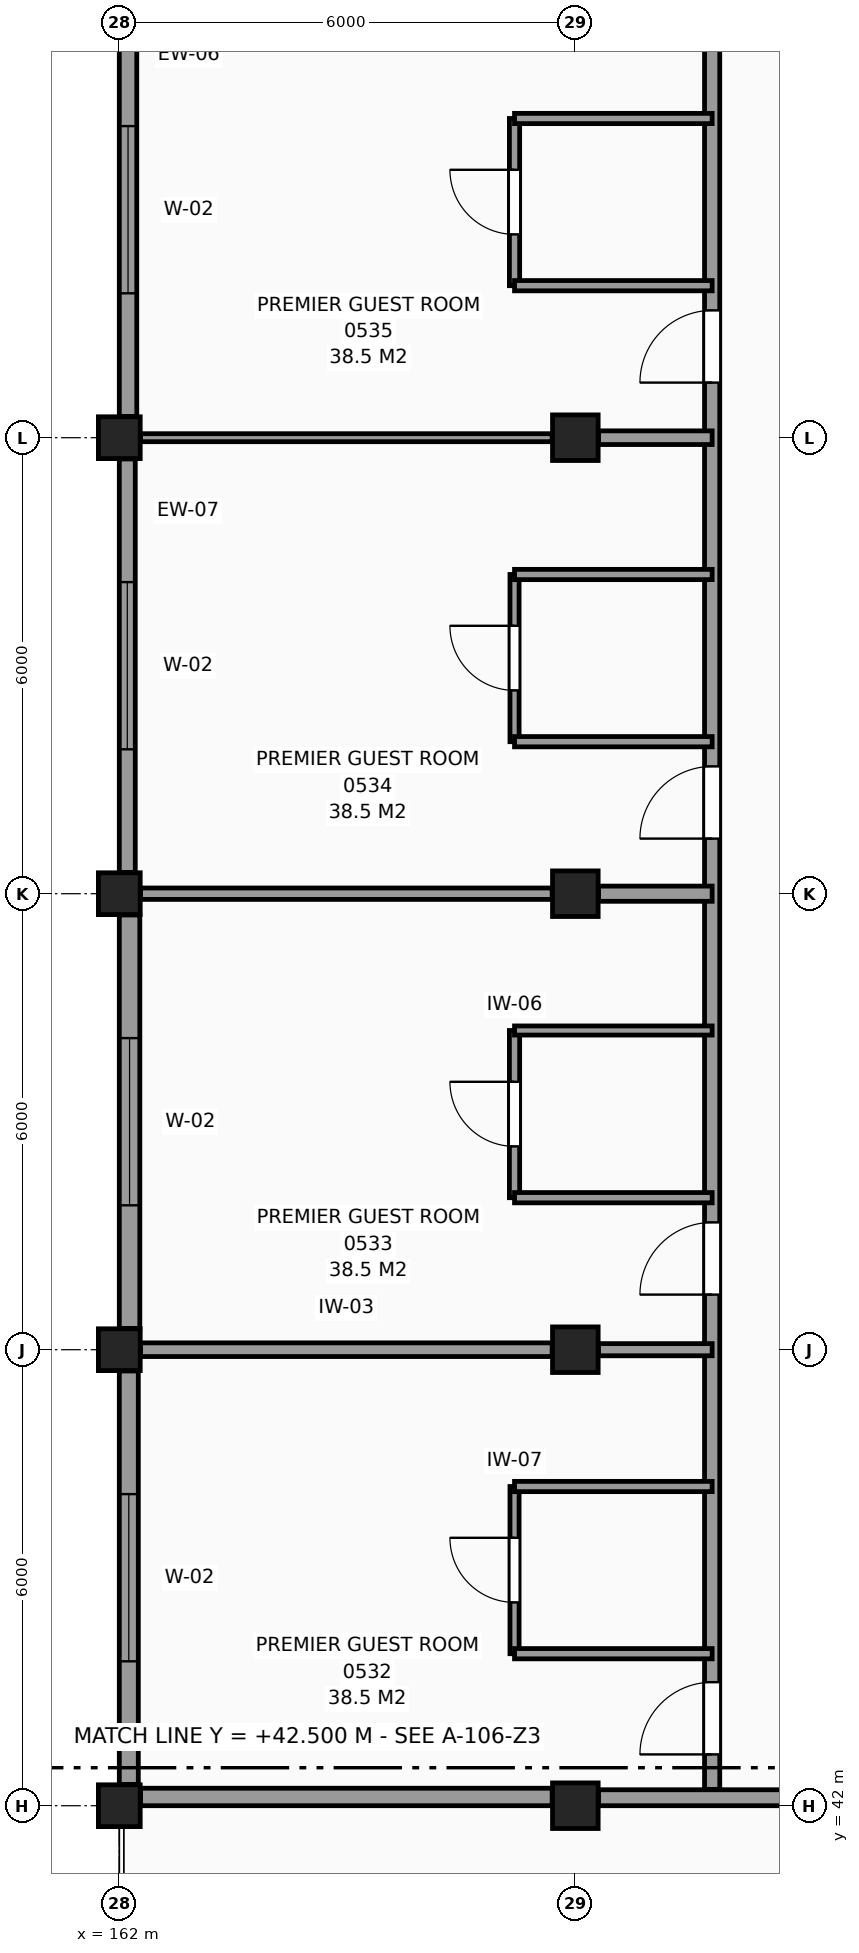
"""IFC4 building model, lengths in metres.
Left out: names, types, materials, properties, quantities, classifications, styles, units other than length and angle.
Written with IfcOpenShell. Run it as: python <this file> out.ifc"""

import sys

from ifc_helpers import new_model, si_unit, direction, frame, frame_2d, origin, origin_2d, place, context, subcontext, project, spatial, rectangle, extrude, element, fill, save


model = new_model("IFC4")
c1 = context("Model", 3, precision=1e-05, world=origin(), true_north=direction((0.0, 1.0)))
c2 = subcontext(c1, "Body", "Model", "MODEL_VIEW")
j1 = project(units=[si_unit("LENGTHUNIT", "METRE"), si_unit("PLANEANGLEUNIT", "RADIAN")], contexts=[c1])
p1 = place(None, origin())
s1 = spatial("IfcSite", under=j1, at=p1, CompositionType="ELEMENT")
p2 = place(p1, origin())
s2 = spatial("IfcBuilding", under=s1, at=p2, CompositionType="ELEMENT")
p3 = place(p2, frame((0.0, 0.0, 24.6)))
s3 = spatial("IfcBuildingStorey", under=s2, at=p3, CompositionType="ELEMENT", Elevation=24.6)
for number, where, z_axis, x_axis in (
    (1, (162.0, 42.0, 0.0), (0.0, 0.0, 1.0), (1.0, 0.0, 0.0)),
    (2, (162.0, 48.0, 0.0), (0.0, 0.0, 1.0), (1.0, 0.0, 0.0)),
    (3, (162.0, 54.0, 0.0), (0.0, 0.0, 1.0), (1.0, 0.0, 0.0)),
    (4, (162.0, 60.0, 0.0), (0.0, 0.0, 1.0), (1.0, 0.0, 0.0)),
):
    element("IfcColumn", number, at=place(p3, frame(where, z_axis=z_axis, x_axis=x_axis)), inside=s3, PredefinedType="COLUMN", context=c2, shape_type="SweptSolid", body=[
        extrude(rectangle(XDim=0.55, YDim=0.55, at=origin_2d()), origin(), (0.0, 0.0, 1.0), 3.6),
    ])
for number, where, z_axis, x_axis in (
    (5, (168.0, 42.0, 0.0), (0.0, 0.0, 1.0), (1.0, 0.0, 0.0)),
    (6, (168.0, 48.0, 0.0), (0.0, 0.0, 1.0), (1.0, 0.0, 0.0)),
    (7, (168.0, 54.0, 0.0), (0.0, 0.0, 1.0), (1.0, 0.0, 0.0)),
    (8, (168.0, 60.0, 0.0), (0.0, 0.0, 1.0), (1.0, 0.0, 0.0)),
):
    element("IfcColumn", number, at=place(p3, frame(where, z_axis=z_axis, x_axis=x_axis)), inside=s3, PredefinedType="COLUMN", context=c2, shape_type="SweptSolid", body=[
        extrude(rectangle(XDim=0.6, YDim=0.6, at=origin_2d()), origin(), (0.0, 0.0, 1.0), 3.6),
    ])
p4 = place(p3, frame((162.115, 65.72, 0.0), z_axis=(0.0, 0.0, 1.0), x_axis=(0.0, -1.0, 0.0)))
e9 = element("IfcWall", 9, at=p4, inside=s3, PredefinedType="SOLIDWALL", context=c2, shape_type="SweptSolid", body=[
    extrude(rectangle(XDim=5.44, YDim=0.23, at=frame_2d((2.72, 0.0))), origin(), (0.0, 0.0, 1.0), 2.73),
])
p5 = place(p4, frame((1.62, 0.0, 0.8)))
e10 = element("IfcOpeningElement", 10, at=p5, cuts=e9, PredefinedType="OPENING", context=c2, shape_type="SweptSolid", body=[
    extrude(rectangle(XDim=2.2, YDim=1.75, at=frame_2d((1.1, 0.875))), frame((0.0, 0.125, 0.0), z_axis=(0.0, -1.0, 0.0), x_axis=(1.0, 0.0, 0.0)), (0.0, 0.0, 1.0), 0.25),
])
p6 = place(p3, frame((162.105, 59.72, 0.0), z_axis=(0.0, 0.0, 1.0), x_axis=(0.0, -1.0, 0.0)))
e11 = element("IfcWall", 11, at=p6, inside=s3, PredefinedType="SOLIDWALL", context=c2, shape_type="SweptSolid", body=[
    extrude(rectangle(XDim=5.44, YDim=0.21, at=frame_2d((2.72, 0.0))), origin(), (0.0, 0.0, 1.0), 2.73),
])
p7 = place(p6, frame((1.62, 0.0, 0.8)))
e12 = element("IfcOpeningElement", 12, at=p7, cuts=e11, PredefinedType="OPENING", context=c2, shape_type="SweptSolid", body=[
    extrude(rectangle(XDim=2.2, YDim=1.75, at=frame_2d((1.1, 0.875))), frame((0.0, 0.115, 0.0), z_axis=(0.0, -1.0, 0.0), x_axis=(1.0, 0.0, 0.0)), (0.0, 0.0, 1.0), 0.23),
])
p8 = place(p3, frame((162.135, 53.72, 0.0), z_axis=(0.0, 0.0, 1.0), x_axis=(0.0, -1.0, 0.0)))
e13 = element("IfcWall", 13, at=p8, inside=s3, PredefinedType="SOLIDWALL", context=c2, shape_type="SweptSolid", body=[
    extrude(rectangle(XDim=5.44, YDim=0.27, at=frame_2d((2.72, 0.0))), origin(), (0.0, 0.0, 1.0), 2.73),
])
p9 = place(p8, frame((1.62, 0.0, 0.8)))
e14 = element("IfcOpeningElement", 14, at=p9, cuts=e13, PredefinedType="OPENING", context=c2, shape_type="SweptSolid", body=[
    extrude(rectangle(XDim=2.2, YDim=1.75, at=frame_2d((1.1, 0.875))), frame((0.0, 0.145, 0.0), z_axis=(0.0, -1.0, 0.0), x_axis=(1.0, 0.0, 0.0)), (0.0, 0.0, 1.0), 0.29),
])
p10 = place(p3, frame((162.125, 47.72, 0.0), z_axis=(0.0, 0.0, 1.0), x_axis=(0.0, -1.0, 0.0)))
e15 = element("IfcWall", 15, at=p10, inside=s3, PredefinedType="SOLIDWALL", context=c2, shape_type="SweptSolid", body=[
    extrude(rectangle(XDim=5.44, YDim=0.25, at=frame_2d((2.72, 0.0))), origin(), (0.0, 0.0, 1.0), 2.73),
])
p11 = place(p10, frame((1.62, 0.0, 0.8)))
e16 = element("IfcOpeningElement", 16, at=p11, cuts=e15, PredefinedType="OPENING", context=c2, shape_type="SweptSolid", body=[
    extrude(rectangle(XDim=2.2, YDim=1.75, at=frame_2d((1.1, 0.875))), frame((0.0, 0.135, 0.0), z_axis=(0.0, -1.0, 0.0), x_axis=(1.0, 0.0, 0.0)), (0.0, 0.0, 1.0), 0.27),
])
p12 = place(p3, frame((162.28, 42.115, 0.0), z_axis=(0.0, 0.0, 1.0), x_axis=(1.0, 0.0, 0.0)))
e17 = element("IfcWall", 17, at=p12, inside=s3, PredefinedType="SOLIDWALL", context=c2, shape_type="SweptSolid", body=[
    extrude(rectangle(XDim=5.415, YDim=0.23, at=frame_2d((2.708, 0.0))), origin(), (0.0, 0.0, 1.0), 2.58),
])
p13 = place(p3, frame((168.305, 42.105, 0.0), z_axis=(0.0, 0.0, 1.0), x_axis=(1.0, 0.0, 0.0)))
e18 = element("IfcWall", 18, at=p13, inside=s3, PredefinedType="SOLIDWALL", context=c2, shape_type="SweptSolid", body=[
    extrude(rectangle(XDim=5.415, YDim=0.21, at=frame_2d((2.708, 0.0))), origin(), (0.0, 0.0, 1.0), 2.58),
])
p14 = place(p3, frame((167.2, 44.0, 0.0), z_axis=(0.0, 0.0, 1.0), x_axis=(0.0, 1.0, 0.0)))
e19 = element("IfcWall", 19, at=p14, inside=s3, PredefinedType="PARTITIONING", context=c2, shape_type="SweptSolid", body=[
    extrude(rectangle(XDim=2.2, YDim=0.12, at=frame_2d((1.1, 0.0))), origin(), (0.0, 0.0, 1.0), 3.38),
])
p15 = place(p14, frame((0.675, 0.0, 0.0)))
e20 = element("IfcOpeningElement", 20, at=p15, cuts=e19, PredefinedType="OPENING", context=c2, shape_type="SweptSolid", body=[
    extrude(rectangle(XDim=0.85, YDim=2.1, at=frame_2d((0.425, 1.05))), frame((0.0, 0.07, 0.0), z_axis=(0.0, -1.0, 0.0), x_axis=(1.0, 0.0, 0.0)), (0.0, 0.0, 1.0), 0.14),
])
p16 = place(p3, frame((167.2, 50.0, 0.0), z_axis=(0.0, 0.0, 1.0), x_axis=(0.0, 1.0, 0.0)))
e21 = element("IfcWall", 21, at=p16, inside=s3, PredefinedType="PARTITIONING", context=c2, shape_type="SweptSolid", body=[
    extrude(rectangle(XDim=2.2, YDim=0.135, at=frame_2d((1.1, 0.0))), origin(), (0.0, 0.0, 1.0), 3.38),
])
p17 = place(p16, frame((0.675, 0.0, 0.0)))
e22 = element("IfcOpeningElement", 22, at=p17, cuts=e21, PredefinedType="OPENING", context=c2, shape_type="SweptSolid", body=[
    extrude(rectangle(XDim=0.85, YDim=2.1, at=frame_2d((0.425, 1.05))), frame((0.0, 0.078, 0.0), z_axis=(0.0, -1.0, 0.0), x_axis=(1.0, 0.0, 0.0)), (0.0, 0.0, 1.0), 0.155),
])
p18 = place(p3, frame((167.2, 56.0, 0.0), z_axis=(0.0, 0.0, 1.0), x_axis=(0.0, 1.0, 0.0)))
e23 = element("IfcWall", 23, at=p18, inside=s3, PredefinedType="PARTITIONING", context=c2, shape_type="SweptSolid", body=[
    extrude(rectangle(XDim=2.2, YDim=0.12, at=frame_2d((1.1, 0.0))), origin(), (0.0, 0.0, 1.0), 3.38),
])
p19 = place(p18, frame((0.675, 0.0, 0.0)))
e24 = element("IfcOpeningElement", 24, at=p19, cuts=e23, PredefinedType="OPENING", context=c2, shape_type="SweptSolid", body=[
    extrude(rectangle(XDim=0.85, YDim=2.1, at=frame_2d((0.425, 1.05))), frame((0.0, 0.07, 0.0), z_axis=(0.0, -1.0, 0.0), x_axis=(1.0, 0.0, 0.0)), (0.0, 0.0, 1.0), 0.14),
])
p20 = place(p3, frame((167.2, 62.0, 0.0), z_axis=(0.0, 0.0, 1.0), x_axis=(0.0, 1.0, 0.0)))
e25 = element("IfcWall", 25, at=p20, inside=s3, PredefinedType="PARTITIONING", context=c2, shape_type="SweptSolid", body=[
    extrude(rectangle(XDim=2.2, YDim=0.135, at=frame_2d((1.1, 0.0))), origin(), (0.0, 0.0, 1.0), 3.38),
])
p21 = place(p20, frame((0.675, 0.0, 0.0)))
e26 = element("IfcOpeningElement", 26, at=p21, cuts=e25, PredefinedType="OPENING", context=c2, shape_type="SweptSolid", body=[
    extrude(rectangle(XDim=0.85, YDim=2.1, at=frame_2d((0.425, 1.05))), frame((0.0, 0.078, 0.0), z_axis=(0.0, -1.0, 0.0), x_axis=(1.0, 0.0, 0.0)), (0.0, 0.0, 1.0), 0.155),
])
p22 = place(p3, frame((169.8, 42.215, 0.0), z_axis=(0.0, 0.0, 1.0), x_axis=(0.0, 1.0, 0.0)))
e27 = element("IfcWall", 27, at=p22, inside=s3, PredefinedType="PARTITIONING", context=c2, shape_type="SweptSolid", body=[
    extrude(rectangle(XDim=65.605, YDim=0.2, at=frame_2d((32.802, 0.0))), origin(), (0.0, 0.0, 1.0), 3.38),
])
p23 = place(p22, frame((50.185, 0.0, 0.0)))
e28 = element("IfcOpeningElement", 28, at=p23, cuts=e27, PredefinedType="OPENING", context=c2, shape_type="SweptSolid", body=[
    extrude(rectangle(XDim=1.2, YDim=2.2, at=frame_2d((0.6, 1.1))), frame((0.0, 0.11, 0.0), z_axis=(0.0, -1.0, 0.0), x_axis=(1.0, 0.0, 0.0)), (0.0, 0.0, 1.0), 0.22),
])
p24 = place(p22, frame((0.46, 0.0, 0.0)))
e29 = element("IfcOpeningElement", 29, at=p24, cuts=e27, PredefinedType="OPENING", context=c2, shape_type="SweptSolid", body=[
    extrude(rectangle(XDim=0.95, YDim=2.1, at=frame_2d((0.475, 1.05))), frame((0.0, 0.11, 0.0), z_axis=(0.0, -1.0, 0.0), x_axis=(1.0, 0.0, 0.0)), (0.0, 0.0, 1.0), 0.22),
])
p25 = place(p22, frame((6.51, 0.0, 0.0)))
e30 = element("IfcOpeningElement", 30, at=p25, cuts=e27, PredefinedType="OPENING", context=c2, shape_type="SweptSolid", body=[
    extrude(rectangle(XDim=0.95, YDim=2.1, at=frame_2d((0.475, 1.05))), frame((0.0, 0.11, 0.0), z_axis=(0.0, -1.0, 0.0), x_axis=(1.0, 0.0, 0.0)), (0.0, 0.0, 1.0), 0.22),
])
p26 = place(p22, frame((12.51, 0.0, 0.0)))
e31 = element("IfcOpeningElement", 31, at=p26, cuts=e27, PredefinedType="OPENING", context=c2, shape_type="SweptSolid", body=[
    extrude(rectangle(XDim=0.95, YDim=2.1, at=frame_2d((0.475, 1.05))), frame((0.0, 0.11, 0.0), z_axis=(0.0, -1.0, 0.0), x_axis=(1.0, 0.0, 0.0)), (0.0, 0.0, 1.0), 0.22),
])
p27 = place(p22, frame((18.51, 0.0, 0.0)))
e32 = element("IfcOpeningElement", 32, at=p27, cuts=e27, PredefinedType="OPENING", context=c2, shape_type="SweptSolid", body=[
    extrude(rectangle(XDim=0.95, YDim=2.1, at=frame_2d((0.475, 1.05))), frame((0.0, 0.11, 0.0), z_axis=(0.0, -1.0, 0.0), x_axis=(1.0, 0.0, 0.0)), (0.0, 0.0, 1.0), 0.22),
])
p28 = place(p22, frame((24.51, 0.0, 0.0)))
e33 = element("IfcOpeningElement", 33, at=p28, cuts=e27, PredefinedType="OPENING", context=c2, shape_type="SweptSolid", body=[
    extrude(rectangle(XDim=0.95, YDim=2.1, at=frame_2d((0.475, 1.05))), frame((0.0, 0.11, 0.0), z_axis=(0.0, -1.0, 0.0), x_axis=(1.0, 0.0, 0.0)), (0.0, 0.0, 1.0), 0.22),
])
p29 = place(p22, frame((30.51, 0.0, 0.0)))
e34 = element("IfcOpeningElement", 34, at=p29, cuts=e27, PredefinedType="OPENING", context=c2, shape_type="SweptSolid", body=[
    extrude(rectangle(XDim=0.95, YDim=2.1, at=frame_2d((0.475, 1.05))), frame((0.0, 0.11, 0.0), z_axis=(0.0, -1.0, 0.0), x_axis=(1.0, 0.0, 0.0)), (0.0, 0.0, 1.0), 0.22),
])
p30 = place(p22, frame((54.51, 0.0, 0.0)))
e35 = element("IfcOpeningElement", 35, at=p30, cuts=e27, PredefinedType="OPENING", context=c2, shape_type="SweptSolid", body=[
    extrude(rectangle(XDim=0.95, YDim=2.1, at=frame_2d((0.475, 1.05))), frame((0.0, 0.11, 0.0), z_axis=(0.0, -1.0, 0.0), x_axis=(1.0, 0.0, 0.0)), (0.0, 0.0, 1.0), 0.22),
])
p31 = place(p22, frame((60.51, 0.0, 0.0)))
e36 = element("IfcOpeningElement", 36, at=p31, cuts=e27, PredefinedType="OPENING", context=c2, shape_type="SweptSolid", body=[
    extrude(rectangle(XDim=0.95, YDim=2.1, at=frame_2d((0.475, 1.05))), frame((0.0, 0.11, 0.0), z_axis=(0.0, -1.0, 0.0), x_axis=(1.0, 0.0, 0.0)), (0.0, 0.0, 1.0), 0.22),
])
for number, where, z_axis, x_axis in (
    (37, (167.2, 44.0, 0.0), (0.0, 0.0, 1.0), (1.0, 0.0, 0.0)),
    (38, (167.2, 46.2, 0.0), (0.0, 0.0, 1.0), (1.0, 0.0, 0.0)),
):
    element("IfcWall", number, at=place(p3, frame(where, z_axis=z_axis, x_axis=x_axis)), inside=s3, PredefinedType="PARTITIONING", context=c2, shape_type="SweptSolid", body=[
        extrude(rectangle(XDim=2.6, YDim=0.135, at=frame_2d((1.3, 0.0))), origin(), (0.0, 0.0, 1.0), 3.38),
    ])
p32 = place(p3, frame((162.28, 48.0, 0.0), z_axis=(0.0, 0.0, 1.0), x_axis=(1.0, 0.0, 0.0)))
e39 = element("IfcWall", 39, at=p32, inside=s3, PredefinedType="PARTITIONING", context=c2, shape_type="SweptSolid", body=[
    extrude(rectangle(XDim=5.415, YDim=0.18, at=frame_2d((2.708, 0.0))), origin(), (0.0, 0.0, 1.0), 2.93),
])
p33 = place(p3, frame((168.305, 48.0, 0.0), z_axis=(0.0, 0.0, 1.0), x_axis=(1.0, 0.0, 0.0)))
e40 = element("IfcWall", 40, at=p33, inside=s3, PredefinedType="PARTITIONING", context=c2, shape_type="SweptSolid", body=[
    extrude(rectangle(XDim=1.495, YDim=0.16, at=frame_2d((0.748, 0.0))), origin(), (0.0, 0.0, 1.0), 3.09),
])
p34 = place(p3, frame((167.2, 50.0, 0.0), z_axis=(0.0, 0.0, 1.0), x_axis=(1.0, 0.0, 0.0)))
e41 = element("IfcWall", 41, at=p34, inside=s3, PredefinedType="PARTITIONING", context=c2, shape_type="SweptSolid", body=[
    extrude(rectangle(XDim=2.6, YDim=0.135, at=frame_2d((1.3, 0.0))), origin(), (0.0, 0.0, 1.0), 3.38),
])
p35 = place(p3, frame((167.2, 52.2, 0.0), z_axis=(0.0, 0.0, 1.0), x_axis=(1.0, 0.0, 0.0)))
e42 = element("IfcWall", 42, at=p35, inside=s3, PredefinedType="PARTITIONING", context=c2, shape_type="SweptSolid", body=[
    extrude(rectangle(XDim=2.6, YDim=0.12, at=frame_2d((1.3, 0.0))), origin(), (0.0, 0.0, 1.0), 3.38),
])
p36 = place(p3, frame((162.28, 54.0, 0.0), z_axis=(0.0, 0.0, 1.0), x_axis=(1.0, 0.0, 0.0)))
e43 = element("IfcWall", 43, at=p36, inside=s3, PredefinedType="PARTITIONING", context=c2, shape_type="SweptSolid", body=[
    extrude(rectangle(XDim=5.415, YDim=0.15, at=frame_2d((2.708, 0.0))), origin(), (0.0, 0.0, 1.0), 2.58),
])
p37 = place(p3, frame((168.305, 54.0, 0.0), z_axis=(0.0, 0.0, 1.0), x_axis=(1.0, 0.0, 0.0)))
e44 = element("IfcWall", 44, at=p37, inside=s3, PredefinedType="PARTITIONING", context=c2, shape_type="SweptSolid", body=[
    extrude(rectangle(XDim=1.495, YDim=0.2, at=frame_2d((0.748, 0.0))), origin(), (0.0, 0.0, 1.0), 2.58),
])
for number, where, z_axis, x_axis in (
    (45, (167.2, 56.0, 0.0), (0.0, 0.0, 1.0), (1.0, 0.0, 0.0)),
    (46, (167.2, 58.2, 0.0), (0.0, 0.0, 1.0), (1.0, 0.0, 0.0)),
):
    element("IfcWall", number, at=place(p3, frame(where, z_axis=z_axis, x_axis=x_axis)), inside=s3, PredefinedType="PARTITIONING", context=c2, shape_type="SweptSolid", body=[
        extrude(rectangle(XDim=2.6, YDim=0.135, at=frame_2d((1.3, 0.0))), origin(), (0.0, 0.0, 1.0), 3.38),
    ])
p38 = place(p3, frame((162.28, 60.0, 0.0), z_axis=(0.0, 0.0, 1.0), x_axis=(1.0, 0.0, 0.0)))
e47 = element("IfcWall", 47, at=p38, inside=s3, PredefinedType="PARTITIONING", context=c2, shape_type="SweptSolid", body=[
    extrude(rectangle(XDim=5.415, YDim=0.105, at=frame_2d((2.708, 0.0))), origin(), (0.0, 0.0, 1.0), 2.58),
])
p39 = place(p3, frame((168.305, 60.0, 0.0), z_axis=(0.0, 0.0, 1.0), x_axis=(1.0, 0.0, 0.0)))
e48 = element("IfcWall", 48, at=p39, inside=s3, PredefinedType="PARTITIONING", context=c2, shape_type="SweptSolid", body=[
    extrude(rectangle(XDim=1.495, YDim=0.18, at=frame_2d((0.748, 0.0))), origin(), (0.0, 0.0, 1.0), 2.58),
])
for number, where, z_axis, x_axis in (
    (49, (167.2, 62.0, 0.0), (0.0, 0.0, 1.0), (1.0, 0.0, 0.0)),
    (50, (167.2, 64.2, 0.0), (0.0, 0.0, 1.0), (1.0, 0.0, 0.0)),
):
    element("IfcWall", number, at=place(p3, frame(where, z_axis=z_axis, x_axis=x_axis)), inside=s3, PredefinedType="PARTITIONING", context=c2, shape_type="SweptSolid", body=[
        extrude(rectangle(XDim=2.6, YDim=0.135, at=frame_2d((1.3, 0.0))), origin(), (0.0, 0.0, 1.0), 3.38),
    ])
p40 = place(p11, origin())
e51 = element("IfcWindow", 51, at=p40, inside=s3, PartitioningType="SINGLE_PANEL", PredefinedType="WINDOW", context=c2, shape_type="SweptSolid", body=[
    extrude(rectangle(XDim=2.2, YDim=1.75, at=frame_2d((1.1, 0.875))), frame((0.0, 0.03, 0.0), z_axis=(0.0, -1.0, 0.0), x_axis=(1.0, 0.0, 0.0)), (0.0, 0.0, 1.0), 0.06),
])
fill(e16, e51)
p41 = place(p9, origin())
e52 = element("IfcWindow", 52, at=p41, inside=s3, PartitioningType="SINGLE_PANEL", PredefinedType="WINDOW", context=c2, shape_type="SweptSolid", body=[
    extrude(rectangle(XDim=2.2, YDim=1.75, at=frame_2d((1.1, 0.875))), frame((0.0, 0.03, 0.0), z_axis=(0.0, -1.0, 0.0), x_axis=(1.0, 0.0, 0.0)), (0.0, 0.0, 1.0), 0.06),
])
fill(e14, e52)
p42 = place(p7, origin())
e53 = element("IfcWindow", 53, at=p42, inside=s3, PartitioningType="SINGLE_PANEL", PredefinedType="WINDOW", context=c2, shape_type="SweptSolid", body=[
    extrude(rectangle(XDim=2.2, YDim=1.75, at=frame_2d((1.1, 0.875))), frame((0.0, 0.03, 0.0), z_axis=(0.0, -1.0, 0.0), x_axis=(1.0, 0.0, 0.0)), (0.0, 0.0, 1.0), 0.06),
])
fill(e12, e53)
p43 = place(p5, origin())
e54 = element("IfcWindow", 54, at=p43, inside=s3, PartitioningType="SINGLE_PANEL", PredefinedType="WINDOW", context=c2, shape_type="SweptSolid", body=[
    extrude(rectangle(XDim=2.2, YDim=1.75, at=frame_2d((1.1, 0.875))), frame((0.0, 0.03, 0.0), z_axis=(0.0, -1.0, 0.0), x_axis=(1.0, 0.0, 0.0)), (0.0, 0.0, 1.0), 0.06),
])
fill(e10, e54)
p44 = place(p15, origin())
e55 = element("IfcDoor", 55, at=p44, inside=s3, OperationType="SINGLE_SWING_RIGHT", PredefinedType="DOOR", context=c2, shape_type="SweptSolid", body=[
    extrude(rectangle(XDim=0.85, YDim=2.1, at=frame_2d((0.425, 1.05))), frame((0.0, 0.025, 0.0), z_axis=(0.0, -1.0, 0.0), x_axis=(1.0, 0.0, 0.0)), (0.0, 0.0, 1.0), 0.05),
])
fill(e20, e55)
p45 = place(p24, origin())
e56 = element("IfcDoor", 56, at=p45, inside=s3, OperationType="SINGLE_SWING_LEFT", PredefinedType="DOOR", context=c2, shape_type="SweptSolid", body=[
    extrude(rectangle(XDim=0.95, YDim=2.1, at=frame_2d((0.475, 1.05))), frame((0.0, 0.025, 0.0), z_axis=(0.0, -1.0, 0.0), x_axis=(1.0, 0.0, 0.0)), (0.0, 0.0, 1.0), 0.05),
])
fill(e29, e56)
p46 = place(p17, origin())
e57 = element("IfcDoor", 57, at=p46, inside=s3, OperationType="SINGLE_SWING_RIGHT", PredefinedType="DOOR", context=c2, shape_type="SweptSolid", body=[
    extrude(rectangle(XDim=0.85, YDim=2.1, at=frame_2d((0.425, 1.05))), frame((0.0, 0.025, 0.0), z_axis=(0.0, -1.0, 0.0), x_axis=(1.0, 0.0, 0.0)), (0.0, 0.0, 1.0), 0.05),
])
fill(e22, e57)
p47 = place(p25, origin())
e58 = element("IfcDoor", 58, at=p47, inside=s3, OperationType="SINGLE_SWING_LEFT", PredefinedType="DOOR", context=c2, shape_type="SweptSolid", body=[
    extrude(rectangle(XDim=0.95, YDim=2.1, at=frame_2d((0.475, 1.05))), frame((0.0, 0.025, 0.0), z_axis=(0.0, -1.0, 0.0), x_axis=(1.0, 0.0, 0.0)), (0.0, 0.0, 1.0), 0.05),
])
fill(e30, e58)
p48 = place(p19, origin())
e59 = element("IfcDoor", 59, at=p48, inside=s3, OperationType="SINGLE_SWING_RIGHT", PredefinedType="DOOR", context=c2, shape_type="SweptSolid", body=[
    extrude(rectangle(XDim=0.85, YDim=2.1, at=frame_2d((0.425, 1.05))), frame((0.0, 0.025, 0.0), z_axis=(0.0, -1.0, 0.0), x_axis=(1.0, 0.0, 0.0)), (0.0, 0.0, 1.0), 0.05),
])
fill(e24, e59)
p49 = place(p26, origin())
e60 = element("IfcDoor", 60, at=p49, inside=s3, OperationType="SINGLE_SWING_LEFT", PredefinedType="DOOR", context=c2, shape_type="SweptSolid", body=[
    extrude(rectangle(XDim=0.95, YDim=2.1, at=frame_2d((0.475, 1.05))), frame((0.0, 0.025, 0.0), z_axis=(0.0, -1.0, 0.0), x_axis=(1.0, 0.0, 0.0)), (0.0, 0.0, 1.0), 0.05),
])
fill(e31, e60)
p50 = place(p21, origin())
e61 = element("IfcDoor", 61, at=p50, inside=s3, OperationType="SINGLE_SWING_RIGHT", PredefinedType="DOOR", context=c2, shape_type="SweptSolid", body=[
    extrude(rectangle(XDim=0.85, YDim=2.1, at=frame_2d((0.425, 1.05))), frame((0.0, 0.025, 0.0), z_axis=(0.0, -1.0, 0.0), x_axis=(1.0, 0.0, 0.0)), (0.0, 0.0, 1.0), 0.05),
])
fill(e26, e61)
p51 = place(p27, origin())
e62 = element("IfcDoor", 62, at=p51, inside=s3, OperationType="SINGLE_SWING_LEFT", PredefinedType="DOOR", context=c2, shape_type="SweptSolid", body=[
    extrude(rectangle(XDim=0.95, YDim=2.1, at=frame_2d((0.475, 1.05))), frame((0.0, 0.025, 0.0), z_axis=(0.0, -1.0, 0.0), x_axis=(1.0, 0.0, 0.0)), (0.0, 0.0, 1.0), 0.05),
])
fill(e32, e62)
save(model, sys.argv[1])
